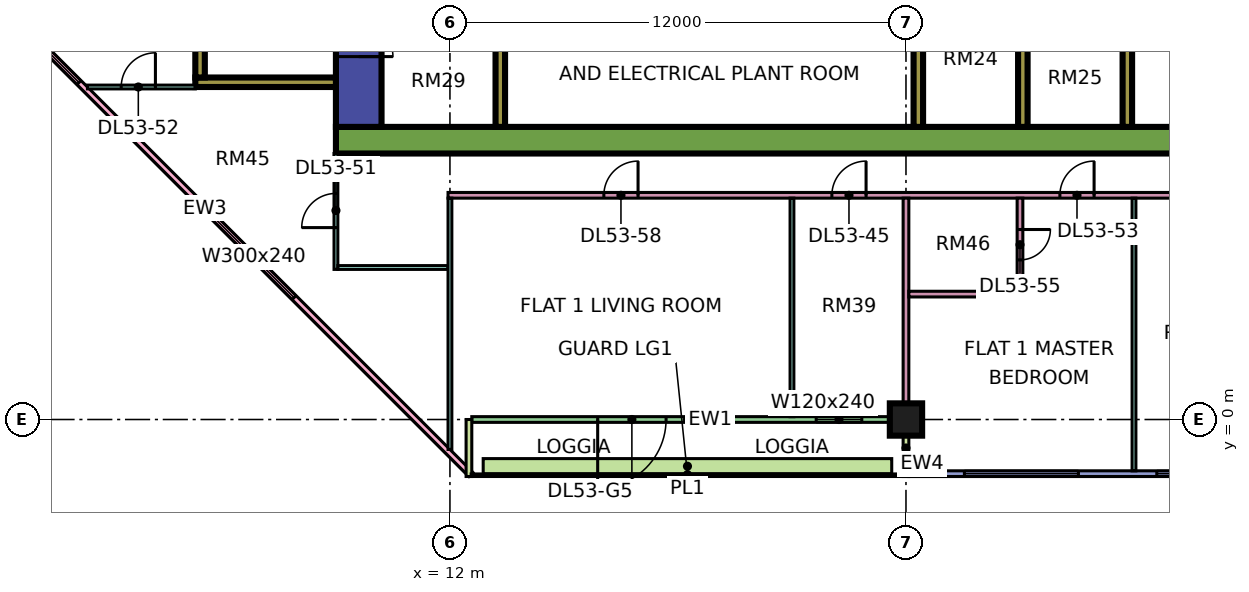
"""IFC4 building model, lengths in metres.
Left out: names, types, materials, properties, quantities, classifications, styles, units other than length and angle.
Written with IfcOpenShell. Run it as: python <this file> out.ifc"""

import sys

from ifc_helpers import new_model, si_unit, direction, frame, frame_2d, origin, origin_2d, place, context, subcontext, project, spatial, rectangle, extrude, element, fill, save


model = new_model("IFC4")
c1 = context("Model", 3, precision=1e-05, world=origin(), true_north=direction((0.0, 1.0)))
c2 = subcontext(c1, "Body", "Model", "MODEL_VIEW")
j1 = project(units=[si_unit("LENGTHUNIT", "METRE"), si_unit("PLANEANGLEUNIT", "RADIAN")], contexts=[c1])
p1 = place(None, origin())
s1 = spatial("IfcSite", under=j1, at=p1, CompositionType="ELEMENT")
p2 = place(p1, origin())
s2 = spatial("IfcBuilding", under=s1, at=p2, CompositionType="ELEMENT")
p3 = place(p2, frame((0.0, 0.0, 226.65)))
s3 = spatial("IfcBuildingStorey", under=s2, at=p3, CompositionType="ELEMENT", Elevation=226.65)
p4 = place(p3, frame((24.0, 0.0, 0.0), z_axis=(0.0, 0.0, 1.0), x_axis=(1.0, 0.0, 0.0)))
e1 = element("IfcColumn", 1, at=p4, inside=s3, PredefinedType="COLUMN", context=c2, shape_type="SweptSolid", body=[
    extrude(rectangle(XDim=0.85, YDim=0.85, at=origin_2d()), origin(), (0.0, 0.0, 1.0), 3.75),
])
p5 = place(p3, frame((9.0, 7.35, 0.0), z_axis=(0.0, 0.0, 1.0), x_axis=(1.0, 0.0, 0.0)))
e2 = element("IfcWall", 2, at=p5, inside=s3, PredefinedType="SHEAR", context=c2, shape_type="SweptSolid", body=[
    extrude(rectangle(XDim=25.0, YDim=0.7, at=frame_2d((12.5, 0.0))), origin(), (0.0, 0.0, 1.0), 3.75),
])
p6 = place(p3, frame((9.6, 7.7, 0.0), z_axis=(0.0, 0.0, 1.0), x_axis=(0.0, 1.0, 0.0)))
e3 = element("IfcWall", 3, at=p6, inside=s3, PredefinedType="SHEAR", context=c2, shape_type="SweptSolid", body=[
    extrude(rectangle(XDim=11.6, YDim=1.2, at=frame_2d((5.8, 0.0))), origin(), (0.0, 0.0, 1.0), 3.75),
])
p7 = place(p6, frame((4.175, 0.0, 0.0)))
e4 = element("IfcOpeningElement", 4, at=p7, cuts=e3, PredefinedType="OPENING", context=c2, shape_type="SweptSolid", body=[
    extrude(rectangle(XDim=1.1, YDim=2.2, at=frame_2d((0.55, 1.1))), frame((0.0, 0.61, 0.0), z_axis=(0.0, -1.0, 0.0), x_axis=(1.0, 0.0, 0.0)), (0.0, 0.0, 1.0), 1.22),
])
p8 = place(p6, frame((6.675, 0.0, 0.0)))
e5 = element("IfcOpeningElement", 5, at=p8, cuts=e3, PredefinedType="OPENING", context=c2, shape_type="SweptSolid", body=[
    extrude(rectangle(XDim=1.1, YDim=2.2, at=frame_2d((0.55, 1.1))), frame((0.0, 0.61, 0.0), z_axis=(0.0, -1.0, 0.0), x_axis=(1.0, 0.0, 0.0)), (0.0, 0.0, 1.0), 1.22),
])
p9 = place(p6, frame((9.55, 0.0, 0.0)))
e6 = element("IfcOpeningElement", 6, at=p9, cuts=e3, PredefinedType="OPENING", context=c2, shape_type="SweptSolid", body=[
    extrude(rectangle(XDim=1.1, YDim=2.2, at=frame_2d((0.55, 1.1))), frame((0.0, 0.61, 0.0), z_axis=(0.0, -1.0, 0.0), x_axis=(1.0, 0.0, 0.0)), (0.0, 0.0, 1.0), 1.22),
])
p10 = place(p6, frame((1.85, 0.0, 0.0)))
e7 = element("IfcOpeningElement", 7, at=p10, cuts=e3, PredefinedType="OPENING", context=c2, shape_type="SweptSolid", body=[
    extrude(rectangle(XDim=0.9, YDim=2.1, at=frame_2d((0.45, 1.05))), frame((0.0, 0.61, 0.0), z_axis=(0.0, -1.0, 0.0), x_axis=(1.0, 0.0, 0.0)), (0.0, 0.0, 1.0), 1.22),
])
p11 = place(p3, frame((13.325, 7.7, 0.0), z_axis=(0.0, 0.0, 1.0), x_axis=(0.0, 1.0, 0.0)))
e8 = element("IfcWall", 8, at=p11, inside=s3, PredefinedType="SHEAR", context=c2, shape_type="SweptSolid", body=[
    extrude(rectangle(XDim=11.6, YDim=0.25, at=frame_2d((5.8, 0.0))), origin(), (0.0, 0.0, 1.0), 3.75),
])
for number, where, z_axis, x_axis in (
    (9, (24.325, 7.7, 0.0), (0.0, 0.0, 1.0), (0.0, 1.0, 0.0)),
    (10, (27.075, 7.7, 0.0), (0.0, 0.0, 1.0), (0.0, 1.0, 0.0)),
    (11, (29.825, 7.7, 0.0), (0.0, 0.0, 1.0), (0.0, 1.0, 0.0)),
):
    element("IfcWall", number, at=place(p3, frame(where, z_axis=z_axis, x_axis=x_axis)), inside=s3, PredefinedType="SHEAR", context=c2, shape_type="SweptSolid", body=[
        extrude(rectangle(XDim=3.5, YDim=0.25, at=frame_2d((1.75, 0.0))), origin(), (0.0, 0.0, 1.0), 3.75),
    ])
p12 = place(p3, frame((5.3, 8.875, 0.0), z_axis=(0.0, 0.0, 1.0), x_axis=(1.0, 0.0, 0.0)))
e12 = element("IfcWall", 12, at=p12, inside=s3, PredefinedType="SHEAR", context=c2, shape_type="SweptSolid", body=[
    extrude(rectangle(XDim=3.7, YDim=0.25, at=frame_2d((1.85, 0.0))), origin(), (0.0, 0.0, 1.0), 3.75),
])
p13 = place(p3, frame((5.425, 9.0, 0.0), z_axis=(0.0, 0.0, 1.0), x_axis=(0.0, 1.0, 0.0)))
e13 = element("IfcWall", 13, at=p13, inside=s3, PredefinedType="SHEAR", context=c2, shape_type="SweptSolid", body=[
    extrude(rectangle(XDim=4.0, YDim=0.25, at=frame_2d((2.0, 0.0))), origin(), (0.0, 0.0, 1.0), 3.75),
])
p14 = place(p3, frame((-1.447, 12.553, 0.0), z_axis=(0.0, 0.0, 1.0), x_axis=(0.707106781187, -0.707106781187, 0.0)))
e14 = element("IfcWall", 14, at=p14, inside=s3, PredefinedType="SOLIDWALL", context=c2, shape_type="SweptSolid", body=[
    extrude(rectangle(XDim=19.799, YDim=0.15, at=frame_2d((9.899, 0.0))), origin(), (0.0, 0.0, 1.0), 3.35),
])
p15 = place(p14, frame((2.212, 0.0, 0.45)))
e15 = element("IfcOpeningElement", 15, at=p15, cuts=e14, PredefinedType="OPENING", context=c2, shape_type="SweptSolid", body=[
    extrude(rectangle(XDim=3.0, YDim=2.4, at=frame_2d((1.5, 1.2))), frame((0.0, 0.085, 0.0), z_axis=(0.0, -1.0, 0.0), x_axis=(1.0, 0.0, 0.0)), (0.0, 0.0, 1.0), 0.17),
])
p16 = place(p14, frame((10.216, 0.0, 0.45)))
e16 = element("IfcOpeningElement", 16, at=p16, cuts=e14, PredefinedType="OPENING", context=c2, shape_type="SweptSolid", body=[
    extrude(rectangle(XDim=3.0, YDim=2.4, at=frame_2d((1.5, 1.2))), frame((0.0, 0.085, 0.0), z_axis=(0.0, -1.0, 0.0), x_axis=(1.0, 0.0, 0.0)), (0.0, 0.0, 1.0), 0.17),
])
p17 = place(p3, frame((12.575, 0.0, 0.0), z_axis=(0.0, 0.0, 1.0), x_axis=(1.0, 0.0, 0.0)))
e17 = element("IfcWall", 17, at=p17, inside=s3, PredefinedType="SOLIDWALL", context=c2, shape_type="SweptSolid", body=[
    extrude(rectangle(XDim=11.35, YDim=0.15, at=frame_2d((5.675, 0.0))), origin(), (0.0, 0.0, 1.0), 3.35),
])
p18 = place(p17, frame((3.312, 0.0, 0.0)))
e18 = element("IfcOpeningElement", 18, at=p18, cuts=e17, PredefinedType="OPENING", context=c2, shape_type="SweptSolid", body=[
    extrude(rectangle(XDim=1.8, YDim=2.4, at=frame_2d((0.9, 1.2))), frame((0.0, 0.085, 0.0), z_axis=(0.0, -1.0, 0.0), x_axis=(1.0, 0.0, 0.0)), (0.0, 0.0, 1.0), 0.17),
])
p19 = place(p17, frame((9.062, 0.0, 0.45)))
e19 = element("IfcOpeningElement", 19, at=p19, cuts=e17, PredefinedType="OPENING", context=c2, shape_type="SweptSolid", body=[
    extrude(rectangle(XDim=1.2, YDim=2.4, at=frame_2d((0.6, 1.2))), frame((0.0, 0.085, 0.0), z_axis=(0.0, -1.0, 0.0), x_axis=(1.0, 0.0, 0.0)), (0.0, 0.0, 1.0), 0.17),
])
for number, where, z_axis, x_axis in (
    (20, (12.5, -1.5, 0.0), (0.0, 0.0, 1.0), (0.0, 1.0, 0.0)),
    (21, (24.0, -1.5, 0.0), (0.0, 0.0, 1.0), (0.0, 1.0, 0.0)),
):
    element("IfcWall", number, at=place(p3, frame(where, z_axis=z_axis, x_axis=x_axis)), inside=s3, PredefinedType="SOLIDWALL", context=c2, shape_type="SweptSolid", body=[
        extrude(rectangle(XDim=1.5, YDim=0.15, at=frame_2d((0.75, 0.0))), origin(), (0.0, 0.0, 1.0), 3.35),
    ])
p20 = place(p3, frame((24.075, -1.425, 0.0), z_axis=(0.0, 0.0, 1.0), x_axis=(1.0, 0.0, 0.0)))
e22 = element("IfcWall", 22, at=p20, inside=s3, PredefinedType="SOLIDWALL", context=c2, shape_type="SweptSolid", body=[
    extrude(rectangle(XDim=11.85, YDim=0.15, at=frame_2d((5.925, 0.0))), origin(), (0.0, 0.0, 1.0), 3.35),
])
p21 = place(p20, frame((1.462, 0.0, 0.45)))
e23 = element("IfcOpeningElement", 23, at=p21, cuts=e22, PredefinedType="OPENING", context=c2, shape_type="SweptSolid", body=[
    extrude(rectangle(XDim=3.0, YDim=2.4, at=frame_2d((1.5, 1.2))), frame((0.0, 0.085, 0.0), z_axis=(0.0, -1.0, 0.0), x_axis=(1.0, 0.0, 0.0)), (0.0, 0.0, 1.0), 0.17),
])
p22 = place(p20, frame((6.525, 0.0, 0.45)))
e24 = element("IfcOpeningElement", 24, at=p22, cuts=e22, PredefinedType="OPENING", context=c2, shape_type="SweptSolid", body=[
    extrude(rectangle(XDim=1.8, YDim=2.4, at=frame_2d((0.9, 1.2))), frame((0.0, 0.085, 0.0), z_axis=(0.0, -1.0, 0.0), x_axis=(1.0, 0.0, 0.0)), (0.0, 0.0, 1.0), 0.17),
])
p23 = place(p20, frame((9.488, 0.0, 0.45)))
e25 = element("IfcOpeningElement", 25, at=p23, cuts=e22, PredefinedType="OPENING", context=c2, shape_type="SweptSolid", body=[
    extrude(rectangle(XDim=1.8, YDim=2.4, at=frame_2d((0.9, 1.2))), frame((0.0, 0.085, 0.0), z_axis=(0.0, -1.0, 0.0), x_axis=(1.0, 0.0, 0.0)), (0.0, 0.0, 1.0), 0.17),
])
p24 = place(p3, frame((12.875, -1.229, 0.0), z_axis=(0.0, 0.0, 1.0), x_axis=(1.0, 0.0, 0.0)))
e26 = element("IfcWall", 26, at=p24, inside=s3, PredefinedType="SOLIDWALL", context=c2, shape_type="SweptSolid", body=[
    extrude(rectangle(XDim=10.75, YDim=0.4, at=frame_2d((5.375, 0.0))), origin(), (0.0, 0.0, 1.0), 0.7),
])
p25 = place(p3, frame((2.461, 8.75, 0.0), z_axis=(0.0, 0.0, 1.0), x_axis=(1.0, 0.0, 0.0)))
e27 = element("IfcWall", 27, at=p25, inside=s3, PredefinedType="PARTITIONING", context=c2, shape_type="SweptSolid", body=[
    extrude(rectangle(XDim=2.839, YDim=0.1, at=frame_2d((1.419, 0.0))), origin(), (0.0, 0.0, 1.0), 3.35),
])
p26 = place(p25, frame((0.889, 0.0, 0.0)))
e28 = element("IfcOpeningElement", 28, at=p26, cuts=e27, PredefinedType="OPENING", context=c2, shape_type="SweptSolid", body=[
    extrude(rectangle(XDim=0.9, YDim=2.1, at=frame_2d((0.45, 1.05))), frame((0.0, 0.06, 0.0), z_axis=(0.0, -1.0, 0.0), x_axis=(1.0, 0.0, 0.0)), (0.0, 0.0, 1.0), 0.12),
])
p27 = place(p3, frame((9.0, 3.95, 0.0), z_axis=(0.0, 0.0, 1.0), x_axis=(0.0, 1.0, 0.0)))
e29 = element("IfcWall", 29, at=p27, inside=s3, PredefinedType="PARTITIONING", context=c2, shape_type="SweptSolid", body=[
    extrude(rectangle(XDim=3.05, YDim=0.1, at=frame_2d((1.525, 0.0))), origin(), (0.0, 0.0, 1.0), 3.35),
])
p28 = place(p27, frame((1.1, 0.0, 0.0)))
e30 = element("IfcOpeningElement", 30, at=p28, cuts=e29, PredefinedType="OPENING", context=c2, shape_type="SweptSolid", body=[
    extrude(rectangle(XDim=0.9, YDim=2.1, at=frame_2d((0.45, 1.05))), frame((0.0, 0.06, 0.0), z_axis=(0.0, -1.0, 0.0), x_axis=(1.0, 0.0, 0.0)), (0.0, 0.0, 1.0), 0.12),
])
p29 = place(p3, frame((9.05, 4.0, 0.0), z_axis=(0.0, 0.0, 1.0), x_axis=(1.0, 0.0, 0.0)))
e31 = element("IfcWall", 31, at=p29, inside=s3, PredefinedType="PARTITIONING", context=c2, shape_type="SweptSolid", body=[
    extrude(rectangle(XDim=2.9, YDim=0.1, at=frame_2d((1.45, 0.0))), origin(), (0.0, 0.0, 1.0), 3.35),
])
p30 = place(p3, frame((11.95, 5.9, 0.0), z_axis=(0.0, 0.0, 1.0), x_axis=(1.0, 0.0, 0.0)))
e32 = element("IfcWall", 32, at=p30, inside=s3, PredefinedType="PARTITIONING", context=c2, shape_type="SweptSolid", body=[
    extrude(rectangle(XDim=21.1, YDim=0.15, at=frame_2d((10.55, 0.0))), origin(), (0.0, 0.0, 1.0), 3.35),
])
p31 = place(p30, frame((10.1, 0.0, 0.0)))
e33 = element("IfcOpeningElement", 33, at=p31, cuts=e32, PredefinedType="OPENING", context=c2, shape_type="SweptSolid", body=[
    extrude(rectangle(XDim=0.9, YDim=2.1, at=frame_2d((0.45, 1.05))), frame((0.0, 0.085, 0.0), z_axis=(0.0, -1.0, 0.0), x_axis=(1.0, 0.0, 0.0)), (0.0, 0.0, 1.0), 0.17),
])
p32 = place(p30, frame((16.1, 0.0, 0.0)))
e34 = element("IfcOpeningElement", 34, at=p32, cuts=e32, PredefinedType="OPENING", context=c2, shape_type="SweptSolid", body=[
    extrude(rectangle(XDim=0.9, YDim=2.1, at=frame_2d((0.45, 1.05))), frame((0.0, 0.085, 0.0), z_axis=(0.0, -1.0, 0.0), x_axis=(1.0, 0.0, 0.0)), (0.0, 0.0, 1.0), 0.17),
])
p33 = place(p30, frame((4.1, 0.0, 0.0)))
e35 = element("IfcOpeningElement", 35, at=p33, cuts=e32, PredefinedType="OPENING", context=c2, shape_type="SweptSolid", body=[
    extrude(rectangle(XDim=0.9, YDim=2.1, at=frame_2d((0.45, 1.05))), frame((0.0, 0.085, 0.0), z_axis=(0.0, -1.0, 0.0), x_axis=(1.0, 0.0, 0.0)), (0.0, 0.0, 1.0), 0.17),
])
p34 = place(p3, frame((12.0, -0.788, 0.0), z_axis=(0.0, 0.0, 1.0), x_axis=(0.0, 1.0, 0.0)))
e36 = element("IfcWall", 36, at=p34, inside=s3, PredefinedType="PARTITIONING", context=c2, shape_type="SweptSolid", body=[
    extrude(rectangle(XDim=6.613, YDim=0.1, at=frame_2d((3.306, 0.0))), origin(), (0.0, 0.0, 1.0), 3.35),
])
p35 = place(p3, frame((21.0, 0.074, 0.0), z_axis=(0.0, 0.0, 1.0), x_axis=(0.0, 1.0, 0.0)))
e37 = element("IfcWall", 37, at=p35, inside=s3, PredefinedType="PARTITIONING", context=c2, shape_type="SweptSolid", body=[
    extrude(rectangle(XDim=5.751, YDim=0.1, at=frame_2d((2.875, 0.0))), origin(), (0.0, 0.0, 1.0), 3.35),
])
p36 = place(p3, frame((24.0, 0.0, 0.0), z_axis=(0.0, 0.0, 1.0), x_axis=(0.0, 1.0, 0.0)))
e38 = element("IfcWall", 38, at=p36, inside=s3, PredefinedType="PARTITIONING", context=c2, shape_type="SweptSolid", body=[
    extrude(rectangle(XDim=5.825, YDim=0.15, at=frame_2d((2.913, 0.0))), origin(), (0.0, 0.0, 1.0), 3.35),
])
p37 = place(p3, frame((24.075, 3.3, 0.0), z_axis=(0.0, 0.0, 1.0), x_axis=(1.0, 0.0, 0.0)))
e39 = element("IfcWall", 39, at=p37, inside=s3, PredefinedType="PARTITIONING", context=c2, shape_type="SweptSolid", body=[
    extrude(rectangle(XDim=3.0, YDim=0.15, at=frame_2d((1.5, 0.0))), origin(), (0.0, 0.0, 1.0), 3.35),
])
p38 = place(p3, frame((27.0, 3.375, 0.0), z_axis=(0.0, 0.0, 1.0), x_axis=(0.0, 1.0, 0.0)))
e40 = element("IfcWall", 40, at=p38, inside=s3, PredefinedType="PARTITIONING", context=c2, shape_type="SweptSolid", body=[
    extrude(rectangle(XDim=2.45, YDim=0.15, at=frame_2d((1.225, 0.0))), origin(), (0.0, 0.0, 1.0), 3.35),
])
p39 = place(p38, frame((0.825, 0.0, 0.0)))
e41 = element("IfcOpeningElement", 41, at=p39, cuts=e40, PredefinedType="OPENING", context=c2, shape_type="SweptSolid", body=[
    extrude(rectangle(XDim=0.8, YDim=2.1, at=frame_2d((0.4, 1.05))), frame((0.0, 0.085, 0.0), z_axis=(0.0, -1.0, 0.0), x_axis=(1.0, 0.0, 0.0)), (0.0, 0.0, 1.0), 0.17),
])
p40 = place(p3, frame((30.0, -1.351, 0.0), z_axis=(0.0, 0.0, 1.0), x_axis=(0.0, 1.0, 0.0)))
e42 = element("IfcWall", 42, at=p40, inside=s3, PredefinedType="PARTITIONING", context=c2, shape_type="SweptSolid", body=[
    extrude(rectangle(XDim=7.176, YDim=0.1, at=frame_2d((3.588, 0.0))), origin(), (0.0, 0.0, 1.0), 3.35),
])
p41 = place(p15, origin())
e43 = element("IfcWindow", 43, at=p41, inside=s3, PartitioningType="SINGLE_PANEL", PredefinedType="WINDOW", context=c2, shape_type="SweptSolid", body=[
    extrude(rectangle(XDim=3.0, YDim=2.4, at=frame_2d((1.5, 1.2))), frame((0.0, 0.03, 0.0), z_axis=(0.0, -1.0, 0.0), x_axis=(1.0, 0.0, 0.0)), (0.0, 0.0, 1.0), 0.06),
])
fill(e15, e43)
p42 = place(p16, origin())
e44 = element("IfcWindow", 44, at=p42, inside=s3, PartitioningType="SINGLE_PANEL", PredefinedType="WINDOW", context=c2, shape_type="SweptSolid", body=[
    extrude(rectangle(XDim=3.0, YDim=2.4, at=frame_2d((1.5, 1.2))), frame((0.0, 0.03, 0.0), z_axis=(0.0, -1.0, 0.0), x_axis=(1.0, 0.0, 0.0)), (0.0, 0.0, 1.0), 0.06),
])
fill(e16, e44)
p43 = place(p18, frame((1.8, 0.0, 0.0), z_axis=(0.0, 0.0, 1.0), x_axis=(-1.0, 0.0, 0.0)))
e45 = element("IfcDoor", 45, at=p43, inside=s3, OperationType="DOUBLE_DOOR_SINGLE_SWING", PredefinedType="DOOR", context=c2, shape_type="SweptSolid", body=[
    extrude(rectangle(XDim=1.8, YDim=2.4, at=frame_2d((0.9, 1.2))), frame((0.0, 0.025, 0.0), z_axis=(0.0, -1.0, 0.0), x_axis=(1.0, 0.0, 0.0)), (0.0, 0.0, 1.0), 0.05),
])
fill(e18, e45)
p44 = place(p19, origin())
e46 = element("IfcWindow", 46, at=p44, inside=s3, PartitioningType="SINGLE_PANEL", PredefinedType="WINDOW", context=c2, shape_type="SweptSolid", body=[
    extrude(rectangle(XDim=1.2, YDim=2.4, at=frame_2d((0.6, 1.2))), frame((0.0, 0.03, 0.0), z_axis=(0.0, -1.0, 0.0), x_axis=(1.0, 0.0, 0.0)), (0.0, 0.0, 1.0), 0.06),
])
fill(e19, e46)
p45 = place(p21, origin())
e47 = element("IfcWindow", 47, at=p45, inside=s3, PartitioningType="SINGLE_PANEL", PredefinedType="WINDOW", context=c2, shape_type="SweptSolid", body=[
    extrude(rectangle(XDim=3.0, YDim=2.4, at=frame_2d((1.5, 1.2))), frame((0.0, 0.03, 0.0), z_axis=(0.0, -1.0, 0.0), x_axis=(1.0, 0.0, 0.0)), (0.0, 0.0, 1.0), 0.06),
])
fill(e23, e47)
p46 = place(p22, origin())
e48 = element("IfcWindow", 48, at=p46, inside=s3, PartitioningType="SINGLE_PANEL", PredefinedType="WINDOW", context=c2, shape_type="SweptSolid", body=[
    extrude(rectangle(XDim=1.8, YDim=2.4, at=frame_2d((0.9, 1.2))), frame((0.0, 0.03, 0.0), z_axis=(0.0, -1.0, 0.0), x_axis=(1.0, 0.0, 0.0)), (0.0, 0.0, 1.0), 0.06),
])
fill(e24, e48)
p47 = place(p10, frame((0.9, 0.0, 0.0), z_axis=(0.0, 0.0, 1.0), x_axis=(-1.0, 0.0, 0.0)))
e49 = element("IfcDoor", 49, at=p47, inside=s3, OperationType="SINGLE_SWING_LEFT", PredefinedType="DOOR", context=c2, shape_type="SweptSolid", body=[
    extrude(rectangle(XDim=0.9, YDim=2.1, at=frame_2d((0.45, 1.05))), frame((0.0, 0.025, 0.0), z_axis=(0.0, -1.0, 0.0), x_axis=(1.0, 0.0, 0.0)), (0.0, 0.0, 1.0), 0.05),
])
fill(e7, e49)
p48 = place(p31, frame((0.9, 0.0, 0.0), z_axis=(0.0, 0.0, 1.0), x_axis=(-1.0, 0.0, 0.0)))
e50 = element("IfcDoor", 50, at=p48, inside=s3, OperationType="SINGLE_SWING_RIGHT", PredefinedType="DOOR", context=c2, shape_type="SweptSolid", body=[
    extrude(rectangle(XDim=0.9, YDim=2.1, at=frame_2d((0.45, 1.05))), frame((0.0, 0.025, 0.0), z_axis=(0.0, -1.0, 0.0), x_axis=(1.0, 0.0, 0.0)), (0.0, 0.0, 1.0), 0.05),
])
fill(e33, e50)
p49 = place(p28, origin())
e51 = element("IfcDoor", 51, at=p49, inside=s3, OperationType="SINGLE_SWING_LEFT", PredefinedType="DOOR", context=c2, shape_type="SweptSolid", body=[
    extrude(rectangle(XDim=0.9, YDim=2.1, at=frame_2d((0.45, 1.05))), frame((0.0, 0.025, 0.0), z_axis=(0.0, -1.0, 0.0), x_axis=(1.0, 0.0, 0.0)), (0.0, 0.0, 1.0), 0.05),
])
fill(e30, e51)
p50 = place(p26, frame((0.9, 0.0, 0.0), z_axis=(0.0, 0.0, 1.0), x_axis=(-1.0, 0.0, 0.0)))
e52 = element("IfcDoor", 52, at=p50, inside=s3, OperationType="SINGLE_SWING_RIGHT", PredefinedType="DOOR", context=c2, shape_type="SweptSolid", body=[
    extrude(rectangle(XDim=0.9, YDim=2.1, at=frame_2d((0.45, 1.05))), frame((0.0, 0.025, 0.0), z_axis=(0.0, -1.0, 0.0), x_axis=(1.0, 0.0, 0.0)), (0.0, 0.0, 1.0), 0.05),
])
fill(e28, e52)
p51 = place(p32, frame((0.9, 0.0, 0.0), z_axis=(0.0, 0.0, 1.0), x_axis=(-1.0, 0.0, 0.0)))
e53 = element("IfcDoor", 53, at=p51, inside=s3, OperationType="SINGLE_SWING_RIGHT", PredefinedType="DOOR", context=c2, shape_type="SweptSolid", body=[
    extrude(rectangle(XDim=0.9, YDim=2.1, at=frame_2d((0.45, 1.05))), frame((0.0, 0.025, 0.0), z_axis=(0.0, -1.0, 0.0), x_axis=(1.0, 0.0, 0.0)), (0.0, 0.0, 1.0), 0.05),
])
fill(e34, e53)
p52 = place(p39, origin())
e54 = element("IfcDoor", 54, at=p52, inside=s3, OperationType="SINGLE_SWING_RIGHT", PredefinedType="DOOR", context=c2, shape_type="SweptSolid", body=[
    extrude(rectangle(XDim=0.8, YDim=2.1, at=frame_2d((0.4, 1.05))), frame((0.0, 0.025, 0.0), z_axis=(0.0, -1.0, 0.0), x_axis=(1.0, 0.0, 0.0)), (0.0, 0.0, 1.0), 0.05),
])
fill(e41, e54)
p53 = place(p33, frame((0.9, 0.0, 0.0), z_axis=(0.0, 0.0, 1.0), x_axis=(-1.0, 0.0, 0.0)))
e55 = element("IfcDoor", 55, at=p53, inside=s3, OperationType="SINGLE_SWING_RIGHT", PredefinedType="DOOR", context=c2, shape_type="SweptSolid", body=[
    extrude(rectangle(XDim=0.9, YDim=2.1, at=frame_2d((0.45, 1.05))), frame((0.0, 0.025, 0.0), z_axis=(0.0, -1.0, 0.0), x_axis=(1.0, 0.0, 0.0)), (0.0, 0.0, 1.0), 0.05),
])
fill(e35, e55)
save(model, sys.argv[1])
